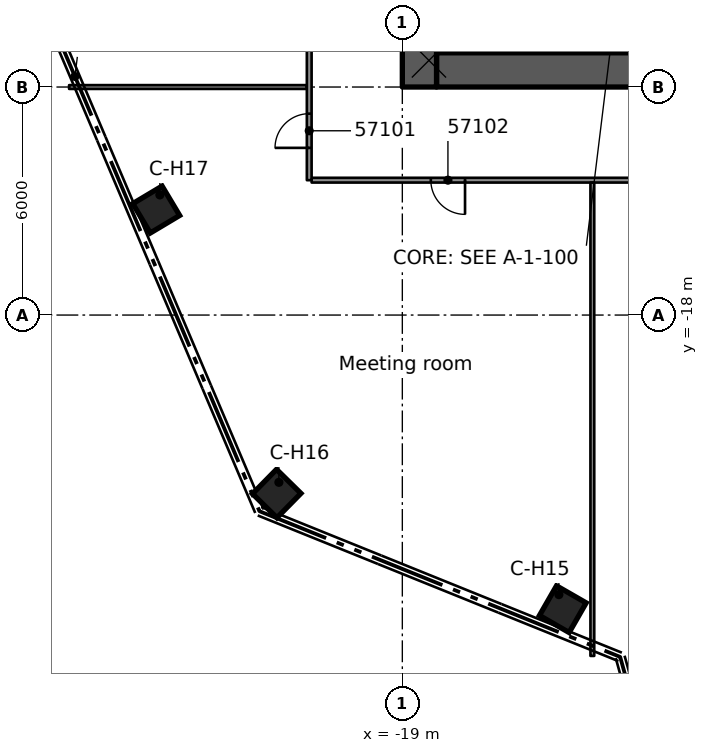
"""IFC4 building model, lengths in metres.
Left out: names, types, materials, properties, quantities, classifications, styles, units other than length and angle.
Written with IfcOpenShell. Run it as: python <this file> out.ifc"""

import sys

from ifc_helpers import new_model, si_unit, direction, frame, frame_2d, origin, origin_2d, place, context, subcontext, project, spatial, rectangle, extrude, element, fill, save


model = new_model("IFC4")
c1 = context("Model", 3, precision=1e-05, world=origin(), true_north=direction((0.0, 1.0)))
c2 = subcontext(c1, "Body", "Model", "MODEL_VIEW")
j1 = project(units=[si_unit("LENGTHUNIT", "METRE"), si_unit("PLANEANGLEUNIT", "RADIAN")], contexts=[c1])
p1 = place(None, origin())
s1 = spatial("IfcSite", under=j1, at=p1, CompositionType="ELEMENT")
p2 = place(p1, origin())
s2 = spatial("IfcBuilding", under=s1, at=p2, CompositionType="ELEMENT")
p3 = place(p2, frame((0.0, 0.0, 282.4)))
s3 = spatial("IfcBuildingStorey", under=s2, at=p3, CompositionType="ELEMENT", Elevation=282.4)
p4 = place(p3, frame((-18.1, -11.55, 0.0), z_axis=(0.0, 0.0, 1.0), x_axis=(1.0, 0.0, 0.0)))
e1 = element("IfcWall", 1, at=p4, inside=s3, PredefinedType="SHEAR", context=c2, shape_type="SweptSolid", body=[
    extrude(rectangle(XDim=9.2, YDim=0.9, at=frame_2d((4.6, 0.0))), origin(), (0.0, 0.0, 1.0), 3.5),
])
p5 = place(p4, frame((5.1, 0.0, 0.0)))
e2 = element("IfcOpeningElement", 2, at=p5, cuts=e1, PredefinedType="OPENING", context=c2, shape_type="SweptSolid", body=[
    extrude(rectangle(XDim=1.1, YDim=2.1, at=frame_2d((0.55, 1.05))), frame((0.0, 0.46, 0.0), z_axis=(0.0, -1.0, 0.0), x_axis=(1.0, 0.0, 0.0)), (0.0, 0.0, 1.0), 0.92),
])
p6 = place(p4, frame((7.53, 0.0, 0.0)))
e3 = element("IfcOpeningElement", 3, at=p6, cuts=e1, PredefinedType="OPENING", context=c2, shape_type="SweptSolid", body=[
    extrude(rectangle(XDim=0.9, YDim=2.1, at=frame_2d((0.45, 1.05))), frame((0.0, 0.46, 0.0), z_axis=(0.0, -1.0, 0.0), x_axis=(1.0, 0.0, 0.0)), (0.0, 0.0, 1.0), 0.92),
])
p7 = place(p3, frame((-18.55, -12.0, 0.0), z_axis=(0.0, 0.0, 1.0), x_axis=(0.0, 1.0, 0.0)))
e4 = element("IfcWall", 4, at=p7, inside=s3, PredefinedType="SHEAR", context=c2, shape_type="SweptSolid", body=[
    extrude(rectangle(XDim=24.0, YDim=0.9, at=frame_2d((12.0, 0.0))), origin(), (0.0, 0.0, 1.0), 3.5),
])
p8 = place(p7, frame((10.1, 0.0, 0.0)))
e5 = element("IfcOpeningElement", 5, at=p8, cuts=e4, PredefinedType="OPENING", context=c2, shape_type="SweptSolid", body=[
    extrude(rectangle(XDim=1.8, YDim=2.1, at=frame_2d((0.9, 1.05))), frame((0.0, 0.46, 0.0), z_axis=(0.0, -1.0, 0.0), x_axis=(1.0, 0.0, 0.0)), (0.0, 0.0, 1.0), 0.92),
])
for number, where, z_axis, x_axis in (
    (6, (-14.777, -25.739, 0.0), (0.0, 0.0, 1.0), (-0.498, -0.867, 0.0)),
    (7, (-22.305, -22.697, 0.0), (0.0, 0.0, 1.0), (-0.701, -0.713, 0.0)),
    (8, (-25.477, -15.224, 0.0), (0.0, 0.0, 1.0), (-0.858, -0.513, 0.0)),
):
    element("IfcColumn", number, at=place(p3, frame(where, z_axis=z_axis, x_axis=x_axis)), inside=s3, PredefinedType="COLUMN", context=c2, shape_type="SweptSolid", body=[
        extrude(rectangle(XDim=0.9, YDim=0.9, at=origin_2d()), origin(), (0.0, 0.0, 1.0), 3.5),
    ])
p9 = place(p3, frame((-10.35, -14.451, 0.0), z_axis=(0.0, 0.0, 1.0), x_axis=(-1.0, 0.0, 0.0)))
e9 = element("IfcWall", 9, at=p9, inside=s3, PredefinedType="PARTITIONING", context=c2, shape_type="SweptSolid", body=[
    extrude(rectangle(XDim=11.037, YDim=0.125, at=frame_2d((5.519, 0.0))), origin(), (0.0, 0.0, 1.0), 3.08),
])
p10 = place(p9, frame((7.0, 0.0, 0.0)))
e10 = element("IfcOpeningElement", 10, at=p10, cuts=e9, PredefinedType="OPENING", context=c2, shape_type="SweptSolid", body=[
    extrude(rectangle(XDim=0.9, YDim=2.1, at=frame_2d((0.45, 1.05))), frame((0.0, 0.073, 0.0), z_axis=(0.0, -1.0, 0.0), x_axis=(1.0, 0.0, 0.0)), (0.0, 0.0, 1.0), 0.145),
])
p11 = place(p9, frame((1.35, 0.0, 0.0)))
e11 = element("IfcOpeningElement", 11, at=p11, cuts=e9, PredefinedType="OPENING", context=c2, shape_type="SweptSolid", body=[
    extrude(rectangle(XDim=0.9, YDim=2.1, at=frame_2d((0.45, 1.05))), frame((0.0, 0.073, 0.0), z_axis=(0.0, -1.0, 0.0), x_axis=(1.0, 0.0, 0.0)), (0.0, 0.0, 1.0), 0.145),
])
p12 = place(p3, frame((-27.769, -12.0, 0.0), z_axis=(0.0, 0.0, 1.0), x_axis=(1.0, 0.0, 0.0)))
e12 = element("IfcWall", 12, at=p12, inside=s3, PredefinedType="PARTITIONING", context=c2, shape_type="SweptSolid", body=[
    extrude(rectangle(XDim=6.257, YDim=0.1, at=frame_2d((3.128, 0.0))), origin(), (0.0, 0.0, 1.0), 3.08),
])
p13 = place(p3, frame((-14.0, -26.969, 0.0), z_axis=(0.0, 0.0, 1.0), x_axis=(0.0, 1.0, 0.0)))
e13 = element("IfcWall", 13, at=p13, inside=s3, PredefinedType="PARTITIONING", context=c2, shape_type="SweptSolid", body=[
    extrude(rectangle(XDim=12.455, YDim=0.1, at=frame_2d((6.228, 0.0))), origin(), (0.0, 0.0, 1.0), 3.08),
])
p14 = place(p3, frame((-21.45, -14.451, 0.0), z_axis=(0.0, 0.0, 1.0), x_axis=(0.0, 1.0, 0.0)))
e14 = element("IfcWall", 14, at=p14, inside=s3, PredefinedType="PARTITIONING", context=c2, shape_type="SweptSolid", body=[
    extrude(rectangle(XDim=28.902, YDim=0.125, at=frame_2d((14.451, 0.0))), origin(), (0.0, 0.0, 1.0), 3.08),
])
p15 = place(p14, frame((8.051, 0.0, 0.0)))
e15 = element("IfcOpeningElement", 15, at=p15, cuts=e14, PredefinedType="OPENING", context=c2, shape_type="SweptSolid", body=[
    extrude(rectangle(XDim=0.9, YDim=2.1, at=frame_2d((0.45, 1.05))), frame((0.0, 0.073, 0.0), z_axis=(0.0, -1.0, 0.0), x_axis=(1.0, 0.0, 0.0)), (0.0, 0.0, 1.0), 0.145),
])
p16 = place(p14, frame((0.85, 0.0, 0.0)))
e16 = element("IfcOpeningElement", 16, at=p16, cuts=e14, PredefinedType="OPENING", context=c2, shape_type="SweptSolid", body=[
    extrude(rectangle(XDim=0.9, YDim=2.1, at=frame_2d((0.45, 1.05))), frame((0.0, 0.073, 0.0), z_axis=(0.0, -1.0, 0.0), x_axis=(1.0, 0.0, 0.0)), (0.0, 0.0, 1.0), 0.145),
])
p17 = place(p14, frame((23.052, 0.0, 0.0)))
e17 = element("IfcOpeningElement", 17, at=p17, cuts=e14, PredefinedType="OPENING", context=c2, shape_type="SweptSolid", body=[
    extrude(rectangle(XDim=0.9, YDim=2.1, at=frame_2d((0.45, 1.05))), frame((0.0, 0.073, 0.0), z_axis=(0.0, -1.0, 0.0), x_axis=(1.0, 0.0, 0.0)), (0.0, 0.0, 1.0), 0.145),
])
p18 = place(p14, frame((16.803, 0.0, 0.0)))
e18 = element("IfcOpeningElement", 18, at=p18, cuts=e14, PredefinedType="OPENING", context=c2, shape_type="SweptSolid", body=[
    extrude(rectangle(XDim=1.1, YDim=2.1, at=frame_2d((0.55, 1.05))), frame((0.0, 0.073, 0.0), z_axis=(0.0, -1.0, 0.0), x_axis=(1.0, 0.0, 0.0)), (0.0, 0.0, 1.0), 0.145),
])
p19 = place(p16, origin())
e19 = element("IfcDoor", 19, at=p19, inside=s3, OperationType="SINGLE_SWING_LEFT", PredefinedType="DOOR", context=c2, shape_type="SweptSolid", body=[
    extrude(rectangle(XDim=0.9, YDim=2.1, at=frame_2d((0.45, 1.05))), frame((0.0, 0.025, 0.0), z_axis=(0.0, -1.0, 0.0), x_axis=(1.0, 0.0, 0.0)), (0.0, 0.0, 1.0), 0.05),
])
fill(e16, e19)
p20 = place(p10, origin())
e20 = element("IfcDoor", 20, at=p20, inside=s3, OperationType="SINGLE_SWING_RIGHT", PredefinedType="DOOR", context=c2, shape_type="SweptSolid", body=[
    extrude(rectangle(XDim=0.9, YDim=2.1, at=frame_2d((0.45, 1.05))), frame((0.0, 0.025, 0.0), z_axis=(0.0, -1.0, 0.0), x_axis=(1.0, 0.0, 0.0)), (0.0, 0.0, 1.0), 0.05),
])
fill(e10, e20)
save(model, sys.argv[1])
